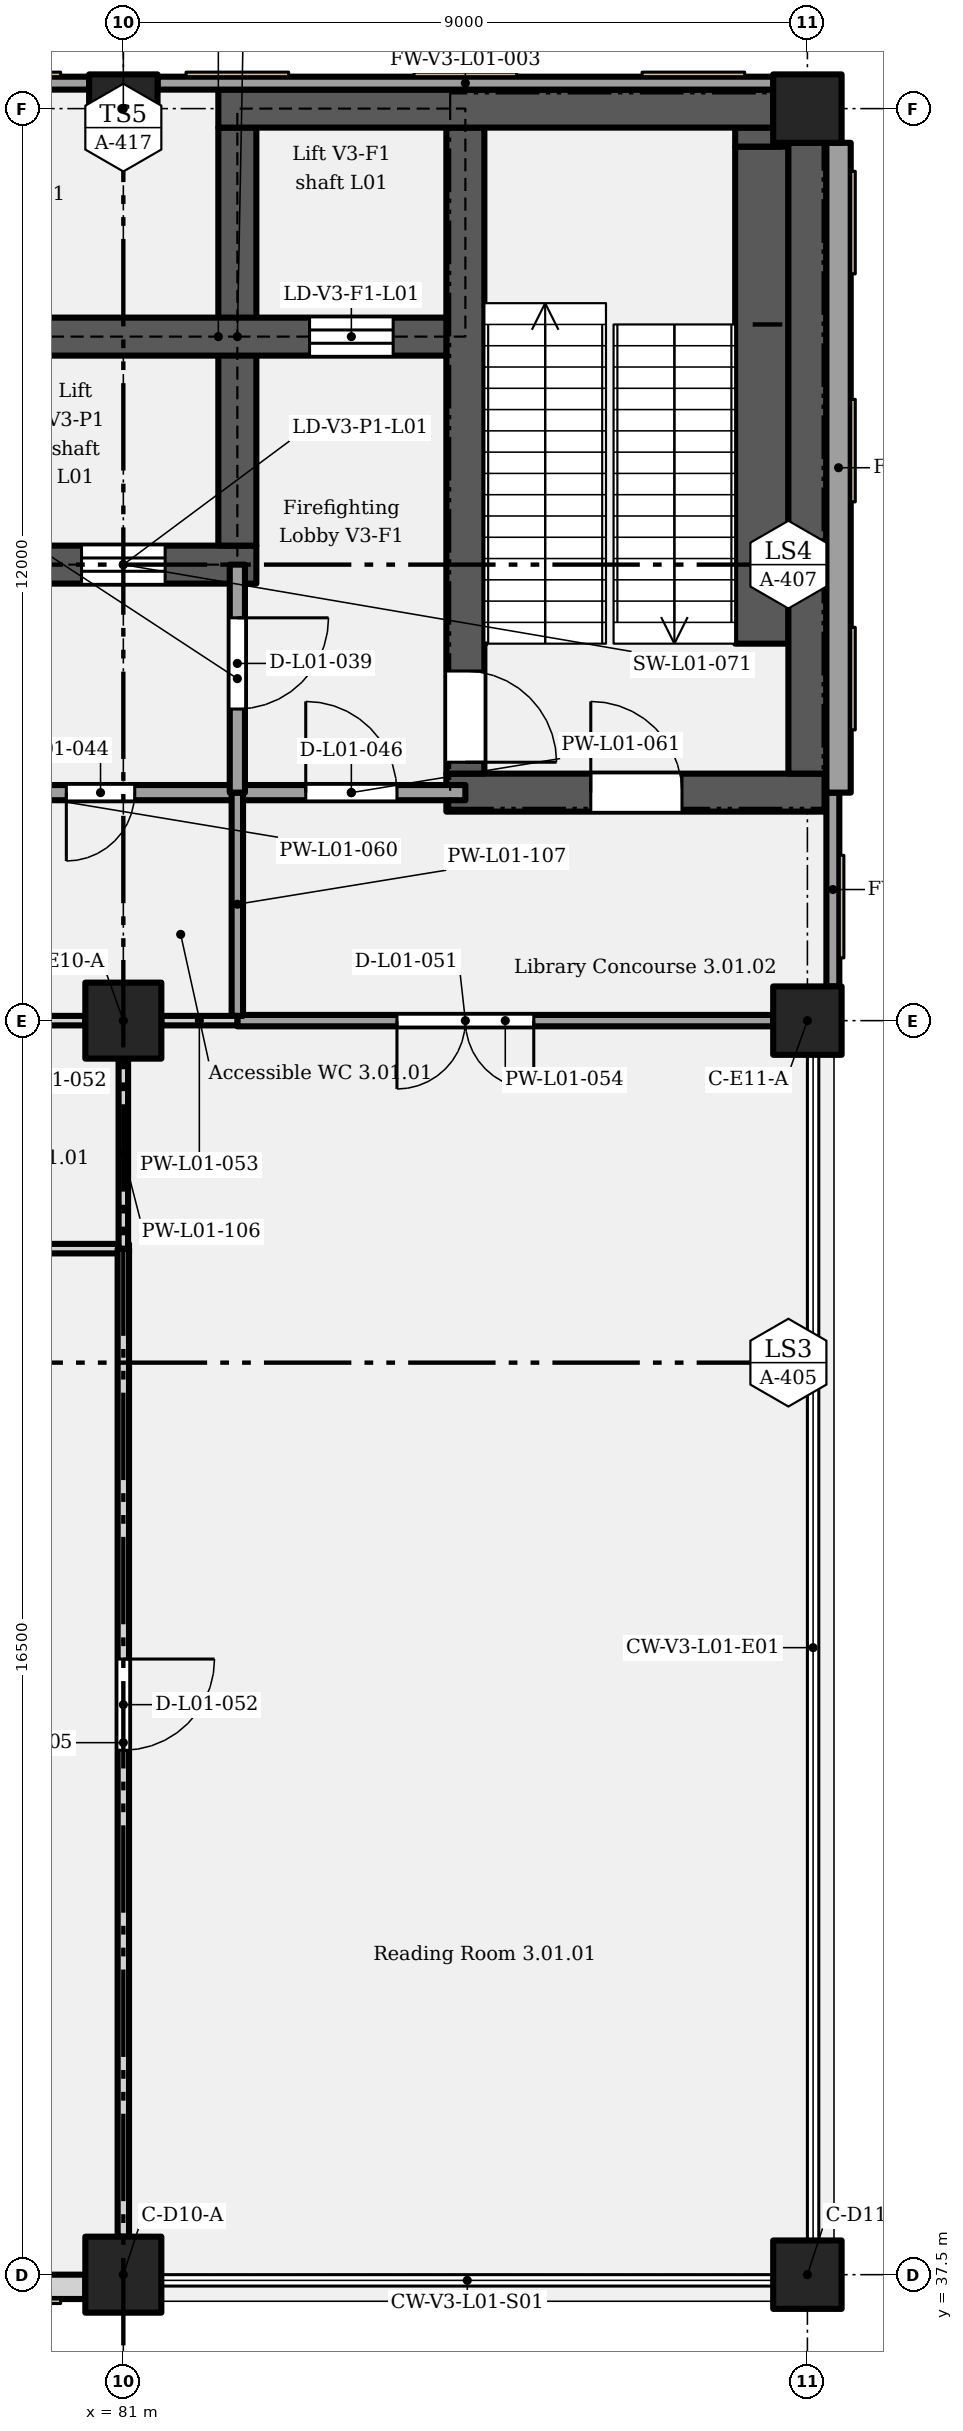
"""IFC4 building model, lengths in metres.
Left out: names, types, materials, properties, quantities, classifications, styles, units other than length and angle.
Written with IfcOpenShell. Run it as: python <this file> out.ifc"""

import sys

from ifc_helpers import new_model, si_unit, direction, frame, frame_2d, origin, origin_2d, place, context, subcontext, project, spatial, rectangle, extrude, element, fill, save


model = new_model("IFC4")
c1 = context("Model", 3, precision=1e-05, world=origin(), true_north=direction((0.0, 1.0)))
c2 = subcontext(c1, "Body", "Model", "MODEL_VIEW")
j1 = project(units=[si_unit("LENGTHUNIT", "METRE"), si_unit("PLANEANGLEUNIT", "RADIAN")], contexts=[c1])
p1 = place(None, origin())
s1 = spatial("IfcSite", under=j1, at=p1, CompositionType="ELEMENT")
p2 = place(p1, origin())
s2 = spatial("IfcBuilding", under=s1, at=p2, CompositionType="ELEMENT")
p3 = place(p2, frame((0.0, 0.0, 6.6)))
s3 = spatial("IfcBuildingStorey", under=s2, at=p3, CompositionType="ELEMENT", Elevation=6.6)
p4 = place(p3, frame((81.0, 37.5, 0.0), z_axis=(0.0, 0.0, 1.0), x_axis=(1.0, 0.0, 0.0)))
e1 = element("IfcColumn", 1, at=p4, inside=s3, PredefinedType="COLUMN", context=c2, shape_type="SweptSolid", body=[
    extrude(rectangle(XDim=1.0, YDim=1.0, at=origin_2d()), origin(), (0.0, 0.0, 1.0), 5.4),
])
p5 = place(p3, frame((90.0, 37.5, 0.0), z_axis=(0.0, 0.0, 1.0), x_axis=(1.0, 0.0, 0.0)))
e2 = element("IfcColumn", 2, at=p5, inside=s3, PredefinedType="COLUMN", context=c2, shape_type="SweptSolid", body=[
    extrude(rectangle(XDim=0.9, YDim=0.9, at=origin_2d()), origin(), (0.0, 0.0, 1.0), 5.4),
])
p6 = place(p3, frame((81.0, 54.0, 0.0), z_axis=(0.0, 0.0, 1.0), x_axis=(1.0, 0.0, 0.0)))
e3 = element("IfcColumn", 3, at=p6, inside=s3, PredefinedType="COLUMN", context=c2, shape_type="SweptSolid", body=[
    extrude(rectangle(XDim=1.0, YDim=1.0, at=origin_2d()), origin(), (0.0, 0.0, 1.0), 5.4),
])
for number, where, z_axis, x_axis in (
    (4, (90.0, 54.0, 0.0), (0.0, 0.0, 1.0), (1.0, 0.0, 0.0)),
    (5, (81.0, 66.0, 0.0), (0.0, 0.0, 1.0), (1.0, 0.0, 0.0)),
    (6, (90.0, 66.0, 0.0), (0.0, 0.0, 1.0), (1.0, 0.0, 0.0)),
):
    element("IfcColumn", number, at=place(p3, frame(where, z_axis=z_axis, x_axis=x_axis)), inside=s3, PredefinedType="COLUMN", context=c2, shape_type="SweptSolid", body=[
        extrude(rectangle(XDim=0.9, YDim=0.9, at=origin_2d()), origin(), (0.0, 0.0, 1.0), 5.4),
    ])
p7 = place(p3, frame((85.25, 57.0, 0.0), z_axis=(0.0, 0.0, 1.0), x_axis=(1.0, 0.0, 0.0)))
e7 = element("IfcWall", 7, at=p7, inside=s3, PredefinedType="SHEAR", context=c2, shape_type="SweptSolid", body=[
    extrude(rectangle(XDim=5.0, YDim=0.5, at=frame_2d((2.5, 0.0))), origin(), (0.0, 0.0, 1.0), 5.1),
])
p8 = place(p7, frame((1.9, 0.0, 0.0)))
e8 = element("IfcOpeningElement", 8, at=p8, cuts=e7, PredefinedType="OPENING", context=c2, shape_type="SweptSolid", body=[
    extrude(rectangle(XDim=1.2, YDim=2.1, at=frame_2d((0.6, 1.05))), frame((0.0, 0.26, 0.0), z_axis=(0.0, -1.0, 0.0), x_axis=(1.0, 0.0, 0.0)), (0.0, 0.0, 1.0), 0.52),
])
p9 = place(p3, frame((85.5, 57.25, 0.0), z_axis=(0.0, 0.0, 1.0), x_axis=(0.0, 1.0, 0.0)))
e9 = element("IfcWall", 9, at=p9, inside=s3, PredefinedType="SHEAR", context=c2, shape_type="SweptSolid", body=[
    extrude(rectangle(XDim=8.5, YDim=0.5, at=frame_2d((4.25, 0.0))), origin(), (0.0, 0.0, 1.0), 5.1),
])
p10 = place(p9, frame((1.35, 0.0, 0.0), z_axis=(0.0, 0.0, 1.0), x_axis=(-1.0, 0.0, 0.0)))
e10 = element("IfcOpeningElement", 10, at=p10, cuts=e9, PredefinedType="OPENING", context=c2, shape_type="SweptSolid", body=[
    extrude(rectangle(XDim=1.2, YDim=2.1, at=frame_2d((0.6, 1.05))), frame((0.0, 0.26, 0.0), z_axis=(0.0, -1.0, 0.0), x_axis=(1.0, 0.0, 0.0)), (0.0, 0.0, 1.0), 0.52),
])
p11 = place(p3, frame((90.0, 57.25, 0.0), z_axis=(0.0, 0.0, 1.0), x_axis=(0.0, 1.0, 0.0)))
e11 = element("IfcWall", 11, at=p11, inside=s3, PredefinedType="SHEAR", context=c2, shape_type="SweptSolid", body=[
    extrude(rectangle(XDim=8.3, YDim=0.5, at=frame_2d((4.15, 0.0))), origin(), (0.0, 0.0, 1.0), 5.1),
])
p12 = place(p3, frame((79.25, 60.0, 0.0), z_axis=(0.0, 0.0, 1.0), x_axis=(1.0, 0.0, 0.0)))
e12 = element("IfcWall", 12, at=p12, inside=s3, PredefinedType="SHEAR", context=c2, shape_type="SweptSolid", body=[
    extrude(rectangle(XDim=3.5, YDim=0.5, at=frame_2d((1.75, 0.0))), origin(), (0.0, 0.0, 1.0), 5.1),
])
p13 = place(p12, frame((1.2, 0.0, 0.0)))
e13 = element("IfcOpeningElement", 13, at=p13, cuts=e12, PredefinedType="OPENING", context=c2, shape_type="SweptSolid", body=[
    extrude(rectangle(XDim=1.1, YDim=2.1, at=frame_2d((0.55, 1.05))), frame((0.0, 0.26, 0.0), z_axis=(0.0, -1.0, 0.0), x_axis=(1.0, 0.0, 0.0)), (0.0, 0.0, 1.0), 0.52),
])
p14 = place(p3, frame((82.5, 60.25, 0.0), z_axis=(0.0, 0.0, 1.0), x_axis=(0.0, 1.0, 0.0)))
e14 = element("IfcWall", 14, at=p14, inside=s3, PredefinedType="SHEAR", context=c2, shape_type="SweptSolid", body=[
    extrude(rectangle(XDim=5.5, YDim=0.5, at=frame_2d((2.75, 0.0))), origin(), (0.0, 0.0, 1.0), 5.1),
])
p15 = place(p3, frame((79.25, 63.0, 0.0), z_axis=(0.0, 0.0, 1.0), x_axis=(1.0, 0.0, 0.0)))
e15 = element("IfcWall", 15, at=p15, inside=s3, PredefinedType="SHEAR", context=c2, shape_type="SweptSolid", body=[
    extrude(rectangle(XDim=6.0, YDim=0.5, at=frame_2d((3.0, 0.0))), origin(), (0.0, 0.0, 1.0), 5.1),
])
p16 = place(p15, frame((4.2, 0.0, 0.0)))
e16 = element("IfcOpeningElement", 16, at=p16, cuts=e15, PredefinedType="OPENING", context=c2, shape_type="SweptSolid", body=[
    extrude(rectangle(XDim=1.1, YDim=2.1, at=frame_2d((0.55, 1.05))), frame((0.0, 0.26, 0.0), z_axis=(0.0, -1.0, 0.0), x_axis=(1.0, 0.0, 0.0)), (0.0, 0.0, 1.0), 0.52),
])
p17 = place(p3, frame((82.25, 66.0, 0.0), z_axis=(0.0, 0.0, 1.0), x_axis=(1.0, 0.0, 0.0)))
e17 = element("IfcWall", 17, at=p17, inside=s3, PredefinedType="SHEAR", context=c2, shape_type="SweptSolid", body=[
    extrude(rectangle(XDim=7.3, YDim=0.5, at=frame_2d((3.65, 0.0))), origin(), (0.0, 0.0, 1.0), 5.1),
])
p18 = place(p3, frame((72.5, 37.34, 0.0), z_axis=(0.0, 0.0, 1.0), x_axis=(1.0, 0.0, 0.0)))
e18 = element("IfcWall", 18, at=p18, inside=s3, PredefinedType="SOLIDWALL", context=c2, shape_type="SweptSolid", body=[
    extrude(rectangle(XDim=8.0, YDim=0.32, at=frame_2d((4.0, 0.0))), origin(), (0.0, 0.0, 1.0), 5.1),
])
for number, where, z_axis, x_axis in (
    (19, (72.45, 66.335, 0.0), (0.0, 0.0, 1.0), (1.0, 0.0, 0.0)),
    (20, (81.45, 66.335, 0.0), (0.0, 0.0, 1.0), (1.0, 0.0, 0.0)),
):
    element("IfcWall", number, at=place(p3, frame(where, z_axis=z_axis, x_axis=x_axis)), inside=s3, PredefinedType="SOLIDWALL", context=c2, shape_type="SweptSolid", body=[
        extrude(rectangle(XDim=8.1, YDim=0.17, at=frame_2d((4.05, 0.0))), origin(), (0.0, 0.0, 1.0), 5.1),
    ])
p19 = place(p3, frame((90.335, 54.45, 0.0), z_axis=(0.0, 0.0, 1.0), x_axis=(0.0, 1.0, 0.0)))
e21 = element("IfcWall", 21, at=p19, inside=s3, PredefinedType="SOLIDWALL", context=c2, shape_type="SweptSolid", body=[
    extrude(rectangle(XDim=2.55, YDim=0.17, at=frame_2d((1.275, 0.0))), origin(), (0.0, 0.0, 1.0), 5.1),
])
p20 = place(p3, frame((90.41, 57.0, 0.0), z_axis=(0.0, 0.0, 1.0), x_axis=(0.0, 1.0, 0.0)))
e22 = element("IfcWall", 22, at=p20, inside=s3, PredefinedType="SOLIDWALL", context=c2, shape_type="SweptSolid", body=[
    extrude(rectangle(XDim=8.55, YDim=0.32, at=frame_2d((4.275, 0.0))), origin(), (0.0, 0.0, 1.0), 5.1),
])
p21 = place(p3, frame((72.0, 51.0, 0.0), z_axis=(0.0, 0.0, 1.0), x_axis=(1.0, 0.0, 0.0)))
e23 = element("IfcWall", 23, at=p21, inside=s3, PredefinedType="PARTITIONING", context=c2, shape_type="SweptSolid", body=[
    extrude(rectangle(XDim=9.075, YDim=0.125, at=frame_2d((4.538, 0.0))), origin(), (0.0, 0.0, 1.0), 5.1),
])
for number, where, z_axis, x_axis in (
    (24, (79.5, 54.0, 0.0), (0.0, 0.0, 1.0), (1.0, 0.0, 0.0)),
    (25, (81.5, 54.0, 0.0), (0.0, 0.0, 1.0), (1.0, 0.0, 0.0)),
):
    element("IfcWall", number, at=place(p3, frame(where, z_axis=z_axis, x_axis=x_axis)), inside=s3, PredefinedType="PARTITIONING", context=c2, shape_type="SweptSolid", body=[
        extrude(rectangle(XDim=1.0, YDim=0.125, at=frame_2d((0.5, 0.0))), origin(), (0.0, 0.0, 1.0), 4.35),
    ])
p22 = place(p3, frame((82.5, 54.0, 0.0), z_axis=(0.0, 0.0, 1.0), x_axis=(1.0, 0.0, 0.0)))
e26 = element("IfcWall", 26, at=p22, inside=s3, PredefinedType="PARTITIONING", context=c2, shape_type="SweptSolid", body=[
    extrude(rectangle(XDim=7.05, YDim=0.15, at=frame_2d((3.525, 0.0))), origin(), (0.0, 0.0, 1.0), 4.35),
])
p23 = place(p22, frame((3.9, 0.0, 0.0), z_axis=(0.0, 0.0, 1.0), x_axis=(-1.0, 0.0, 0.0)))
e27 = element("IfcOpeningElement", 27, at=p23, cuts=e26, PredefinedType="OPENING", context=c2, shape_type="SweptSolid", body=[
    extrude(rectangle(XDim=1.8, YDim=2.4, at=frame_2d((0.9, 1.2))), frame((0.0, 0.085, 0.0), z_axis=(0.0, -1.0, 0.0), x_axis=(1.0, 0.0, 0.0)), (0.0, 0.0, 1.0), 0.17),
])
p24 = place(p3, frame((76.5, 57.0, 0.0), z_axis=(0.0, 0.0, 1.0), x_axis=(1.0, 0.0, 0.0)))
e28 = element("IfcWall", 28, at=p24, inside=s3, PredefinedType="PARTITIONING", context=c2, shape_type="SweptSolid", body=[
    extrude(rectangle(XDim=6.0, YDim=0.2, at=frame_2d((3.0, 0.0))), origin(), (0.0, 0.0, 1.0), 5.1),
])
p25 = place(p24, frame((4.65, 0.0, 0.0), z_axis=(0.0, 0.0, 1.0), x_axis=(-1.0, 0.0, 0.0)))
e29 = element("IfcOpeningElement", 29, at=p25, cuts=e28, PredefinedType="OPENING", context=c2, shape_type="SweptSolid", body=[
    extrude(rectangle(XDim=0.9, YDim=2.1, at=frame_2d((0.45, 1.05))), frame((0.0, 0.11, 0.0), z_axis=(0.0, -1.0, 0.0), x_axis=(1.0, 0.0, 0.0)), (0.0, 0.0, 1.0), 0.22),
])
p26 = place(p24, frame((1.3, 0.0, 0.0)))
e30 = element("IfcOpeningElement", 30, at=p26, cuts=e28, PredefinedType="OPENING", context=c2, shape_type="SweptSolid", body=[
    extrude(rectangle(XDim=1.0, YDim=2.1, at=frame_2d((0.5, 1.05))), frame((0.0, 0.11, 0.0), z_axis=(0.0, -1.0, 0.0), x_axis=(1.0, 0.0, 0.0)), (0.0, 0.0, 1.0), 0.22),
])
p27 = place(p3, frame((82.5, 57.0, 0.0), z_axis=(0.0, 0.0, 1.0), x_axis=(1.0, 0.0, 0.0)))
e31 = element("IfcWall", 31, at=p27, inside=s3, PredefinedType="PARTITIONING", context=c2, shape_type="SweptSolid", body=[
    extrude(rectangle(XDim=3.0, YDim=0.2, at=frame_2d((1.5, 0.0))), origin(), (0.0, 0.0, 1.0), 5.1),
])
p28 = place(p27, frame((0.9, 0.0, 0.0)))
e32 = element("IfcOpeningElement", 32, at=p28, cuts=e31, PredefinedType="OPENING", context=c2, shape_type="SweptSolid", body=[
    extrude(rectangle(XDim=1.2, YDim=2.1, at=frame_2d((0.6, 1.05))), frame((0.0, 0.11, 0.0), z_axis=(0.0, -1.0, 0.0), x_axis=(1.0, 0.0, 0.0)), (0.0, 0.0, 1.0), 0.22),
])
p29 = place(p3, frame((81.0, 38.0, 0.0), z_axis=(0.0, 0.0, 1.0), x_axis=(0.0, 1.0, 0.0)))
e33 = element("IfcWall", 33, at=p29, inside=s3, PredefinedType="PARTITIONING", context=c2, shape_type="SweptSolid", body=[
    extrude(rectangle(XDim=13.0, YDim=0.15, at=frame_2d((6.5, 0.0))), origin(), (0.0, 0.0, 1.0), 4.15),
])
p30 = place(p29, frame((7.6, 0.0, 0.0), z_axis=(0.0, 0.0, 1.0), x_axis=(-1.0, 0.0, 0.0)))
e34 = element("IfcOpeningElement", 34, at=p30, cuts=e33, PredefinedType="OPENING", context=c2, shape_type="SweptSolid", body=[
    extrude(rectangle(XDim=1.2, YDim=2.4, at=frame_2d((0.6, 1.2))), frame((0.0, 0.085, 0.0), z_axis=(0.0, -1.0, 0.0), x_axis=(1.0, 0.0, 0.0)), (0.0, 0.0, 1.0), 0.17),
])
p31 = place(p3, frame((81.0, 51.0, 0.0), z_axis=(0.0, 0.0, 1.0), x_axis=(0.0, 1.0, 0.0)))
e35 = element("IfcWall", 35, at=p31, inside=s3, PredefinedType="PARTITIONING", context=c2, shape_type="SweptSolid", body=[
    extrude(rectangle(XDim=2.5, YDim=0.125, at=frame_2d((1.25, 0.0))), origin(), (0.0, 0.0, 1.0), 4.15),
])
p32 = place(p3, frame((82.5, 54.062, 0.0), z_axis=(0.0, 0.0, 1.0), x_axis=(0.0, 1.0, 0.0)))
e36 = element("IfcWall", 36, at=p32, inside=s3, PredefinedType="PARTITIONING", context=c2, shape_type="SweptSolid", body=[
    extrude(rectangle(XDim=2.938, YDim=0.15, at=frame_2d((1.469, 0.0))), origin(), (0.0, 0.0, 1.0), 5.1),
])
p33 = place(p3, frame((82.5, 57.0, 0.0), z_axis=(0.0, 0.0, 1.0), x_axis=(0.0, 1.0, 0.0)))
e37 = element("IfcWall", 37, at=p33, inside=s3, PredefinedType="PARTITIONING", context=c2, shape_type="SweptSolid", body=[
    extrude(rectangle(XDim=3.0, YDim=0.2, at=frame_2d((1.5, 0.0))), origin(), (0.0, 0.0, 1.0), 5.1),
])
p34 = place(p33, frame((2.3, 0.0, 0.0), z_axis=(0.0, 0.0, 1.0), x_axis=(-1.0, 0.0, 0.0)))
e38 = element("IfcOpeningElement", 38, at=p34, cuts=e37, PredefinedType="OPENING", context=c2, shape_type="SweptSolid", body=[
    extrude(rectangle(XDim=1.2, YDim=2.1, at=frame_2d((0.6, 1.05))), frame((0.0, 0.11, 0.0), z_axis=(0.0, -1.0, 0.0), x_axis=(1.0, 0.0, 0.0)), (0.0, 0.0, 1.0), 0.22),
])
p35 = place(p3, frame((89.4, 58.96, 0.0), z_axis=(0.0, 0.0, 1.0), x_axis=(0.0, 1.0, 0.0)))
e39 = element("IfcWall", 39, at=p35, inside=s3, PredefinedType="SHEAR", context=c2, shape_type="SweptSolid", body=[
    extrude(rectangle(XDim=6.54, YDim=0.7, at=frame_2d((3.27, 0.0))), origin(), (0.0, 0.0, 1.0), 2.587),
])
p36 = place(p3, frame((89.35, 65.5, 0.0), z_axis=(0.0, 0.0, 1.0), x_axis=(0.0, 1.0, 0.0)))
e40 = element("IfcWall", 40, at=p36, inside=s3, PredefinedType="SHEAR", context=c2, shape_type="SweptSolid", body=[
    extrude(rectangle(XDim=0.25, YDim=0.6, at=frame_2d((0.125, 0.0))), origin(), (0.0, 0.0, 1.0), 2.587),
])
p37 = place(p34, origin())
e41 = element("IfcDoor", 41, at=p37, inside=s3, OperationType="SINGLE_SWING_LEFT", PredefinedType="DOOR", context=c2, shape_type="SweptSolid", body=[
    extrude(rectangle(XDim=1.2, YDim=2.1, at=frame_2d((0.6, 1.05))), frame((0.0, 0.025, 0.0), z_axis=(0.0, -1.0, 0.0), x_axis=(1.0, 0.0, 0.0)), (0.0, 0.0, 1.0), 0.05),
])
fill(e38, e41)
p38 = place(p13, origin())
e42 = element("IfcDoor", 42, at=p38, inside=s3, OperationType="SLIDING_TO_LEFT", PredefinedType="DOOR", context=c2, shape_type="SweptSolid", body=[
    extrude(rectangle(XDim=1.1, YDim=2.1, at=frame_2d((0.55, 1.05))), frame((0.0, 0.025, 0.0), z_axis=(0.0, -1.0, 0.0), x_axis=(1.0, 0.0, 0.0)), (0.0, 0.0, 1.0), 0.05),
])
fill(e13, e42)
p39 = place(p16, origin())
e43 = element("IfcDoor", 43, at=p39, inside=s3, OperationType="SLIDING_TO_LEFT", PredefinedType="DOOR", context=c2, shape_type="SweptSolid", body=[
    extrude(rectangle(XDim=1.1, YDim=2.1, at=frame_2d((0.55, 1.05))), frame((0.0, 0.025, 0.0), z_axis=(0.0, -1.0, 0.0), x_axis=(1.0, 0.0, 0.0)), (0.0, 0.0, 1.0), 0.05),
])
fill(e16, e43)
p40 = place(p10, origin())
e44 = element("IfcDoor", 44, at=p40, inside=s3, OperationType="SINGLE_SWING_RIGHT", PredefinedType="DOOR", context=c2, shape_type="SweptSolid", body=[
    extrude(rectangle(XDim=1.2, YDim=2.1, at=frame_2d((0.6, 1.05))), frame((0.0, 0.025, 0.0), z_axis=(0.0, -1.0, 0.0), x_axis=(1.0, 0.0, 0.0)), (0.0, 0.0, 1.0), 0.05),
])
fill(e10, e44)
p41 = place(p25, origin())
e45 = element("IfcDoor", 45, at=p41, inside=s3, OperationType="SINGLE_SWING_RIGHT", PredefinedType="DOOR", context=c2, shape_type="SweptSolid", body=[
    extrude(rectangle(XDim=0.9, YDim=2.1, at=frame_2d((0.45, 1.05))), frame((0.0, 0.025, 0.0), z_axis=(0.0, -1.0, 0.0), x_axis=(1.0, 0.0, 0.0)), (0.0, 0.0, 1.0), 0.05),
])
fill(e29, e45)
p42 = place(p28, origin())
e46 = element("IfcDoor", 46, at=p42, inside=s3, OperationType="SINGLE_SWING_LEFT", PredefinedType="DOOR", context=c2, shape_type="SweptSolid", body=[
    extrude(rectangle(XDim=1.2, YDim=2.1, at=frame_2d((0.6, 1.05))), frame((0.0, 0.025, 0.0), z_axis=(0.0, -1.0, 0.0), x_axis=(1.0, 0.0, 0.0)), (0.0, 0.0, 1.0), 0.05),
])
fill(e32, e46)
p43 = place(p8, origin())
e47 = element("IfcDoor", 47, at=p43, inside=s3, OperationType="SINGLE_SWING_LEFT", PredefinedType="DOOR", context=c2, shape_type="SweptSolid", body=[
    extrude(rectangle(XDim=1.2, YDim=2.1, at=frame_2d((0.6, 1.05))), frame((0.0, 0.025, 0.0), z_axis=(0.0, -1.0, 0.0), x_axis=(1.0, 0.0, 0.0)), (0.0, 0.0, 1.0), 0.05),
])
fill(e8, e47)
p44 = place(p23, origin())
e48 = element("IfcDoor", 48, at=p44, inside=s3, OperationType="DOUBLE_DOOR_SINGLE_SWING", PredefinedType="DOOR", context=c2, shape_type="SweptSolid", body=[
    extrude(rectangle(XDim=1.8, YDim=2.4, at=frame_2d((0.9, 1.2))), frame((0.0, 0.025, 0.0), z_axis=(0.0, -1.0, 0.0), x_axis=(1.0, 0.0, 0.0)), (0.0, 0.0, 1.0), 0.05),
])
fill(e27, e48)
p45 = place(p30, origin())
e49 = element("IfcDoor", 49, at=p45, inside=s3, OperationType="SINGLE_SWING_LEFT", PredefinedType="DOOR", context=c2, shape_type="SweptSolid", body=[
    extrude(rectangle(XDim=1.2, YDim=2.4, at=frame_2d((0.6, 1.2))), frame((0.0, 0.025, 0.0), z_axis=(0.0, -1.0, 0.0), x_axis=(1.0, 0.0, 0.0)), (0.0, 0.0, 1.0), 0.05),
])
fill(e34, e49)
save(model, sys.argv[1])
